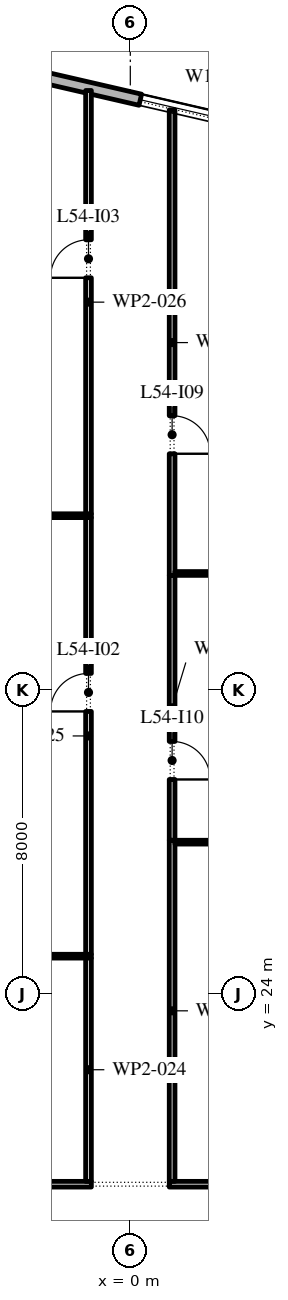
"""IFC4 building model, lengths in metres.
Left out: names, types, materials, properties, quantities, classifications, styles, units other than length and angle.
Written with IfcOpenShell. Run it as: python <this file> out.ifc"""

import sys

from ifc_helpers import new_model, si_unit, direction, frame, frame_2d, origin, place, context, subcontext, project, spatial, rectangle, extrude, element, fill, save


model = new_model("IFC4")
c1 = context("Model", 3, precision=1e-05, world=origin(), true_north=direction((0.0, 1.0)))
c2 = subcontext(c1, "Body", "Model", "MODEL_VIEW")
j1 = project(units=[si_unit("LENGTHUNIT", "METRE"), si_unit("PLANEANGLEUNIT", "RADIAN")], contexts=[c1])
p1 = place(None, origin())
s1 = spatial("IfcSite", under=j1, at=p1, CompositionType="ELEMENT")
p2 = place(p1, origin())
s2 = spatial("IfcBuilding", under=s1, at=p2, CompositionType="ELEMENT")
p3 = place(p2, frame((0.0, 0.0, 251.4)))
s3 = spatial("IfcBuildingStorey", under=s2, at=p3, CompositionType="ELEMENT", Elevation=251.4)
p4 = place(p3, frame((29.616, 40.758, 0.0), z_axis=(0.0, 0.0, 1.0), x_axis=(-0.974370532314, 0.224949029246, 0.0)))
e1 = element("IfcWall", 1, at=p4, inside=s3, PredefinedType="STANDARD", context=c2, shape_type="SweptSolid", body=[
    extrude(rectangle(XDim=48.0, YDim=0.3, at=frame_2d((24.0, 0.0))), origin(), (0.0, 0.0, 1.0), 4.0),
])
p5 = place(p4, frame((1.625, 0.0, 0.45)))
e2 = element("IfcOpeningElement", 2, at=p5, cuts=e1, PredefinedType="OPENING", context=c2, shape_type="SweptSolid", body=[
    extrude(rectangle(XDim=4.5, YDim=2.675, at=frame_2d((2.25, 1.337))), frame((0.0, 0.16, 0.0), z_axis=(0.0, -1.0, 0.0), x_axis=(1.0, 0.0, 0.0)), (0.0, 0.0, 1.0), 0.32),
])
p6 = place(p4, frame((9.975, 0.0, 0.0)))
e3 = element("IfcOpeningElement", 3, at=p6, cuts=e1, PredefinedType="OPENING", context=c2, shape_type="SweptSolid", body=[
    extrude(rectangle(XDim=2.4, YDim=3.5, at=frame_2d((1.2, 1.75))), frame((0.0, 0.16, 0.0), z_axis=(0.0, -1.0, 0.0), x_axis=(1.0, 0.0, 0.0)), (0.0, 0.0, 1.0), 0.32),
])
p7 = place(p4, frame((17.575, 0.0, 0.45)))
e4 = element("IfcOpeningElement", 4, at=p7, cuts=e1, PredefinedType="OPENING", context=c2, shape_type="SweptSolid", body=[
    extrude(rectangle(XDim=4.5, YDim=2.525, at=frame_2d((2.25, 1.262))), frame((0.0, 0.16, 0.0), z_axis=(0.0, -1.0, 0.0), x_axis=(1.0, 0.0, 0.0)), (0.0, 0.0, 1.0), 0.32),
])
p8 = place(p4, frame((25.625, 0.0, 0.45)))
e5 = element("IfcOpeningElement", 5, at=p8, cuts=e1, PredefinedType="OPENING", context=c2, shape_type="SweptSolid", body=[
    extrude(rectangle(XDim=4.5, YDim=2.45, at=frame_2d((2.25, 1.225))), frame((0.0, 0.16, 0.0), z_axis=(0.0, -1.0, 0.0), x_axis=(1.0, 0.0, 0.0)), (0.0, 0.0, 1.0), 0.32),
])
p9 = place(p4, frame((33.675, 0.0, 0.45)))
e6 = element("IfcOpeningElement", 6, at=p9, cuts=e1, PredefinedType="OPENING", context=c2, shape_type="SweptSolid", body=[
    extrude(rectangle(XDim=4.5, YDim=2.45, at=frame_2d((2.25, 1.225))), frame((0.0, 0.16, 0.0), z_axis=(0.0, -1.0, 0.0), x_axis=(1.0, 0.0, 0.0)), (0.0, 0.0, 1.0), 0.32),
])
p10 = place(p4, frame((42.775, 0.0, 0.0)))
e7 = element("IfcOpeningElement", 7, at=p10, cuts=e1, PredefinedType="OPENING", context=c2, shape_type="SweptSolid", body=[
    extrude(rectangle(XDim=2.4, YDim=3.5, at=frame_2d((1.2, 1.75))), frame((0.0, 0.16, 0.0), z_axis=(0.0, -1.0, 0.0), x_axis=(1.0, 0.0, 0.0)), (0.0, 0.0, 1.0), 0.32),
])
p11 = place(p3, frame((-9.29, 36.59, 0.0), z_axis=(0.0, 0.0, 1.0), x_axis=(1.0, 0.0, 0.0)))
e8 = element("IfcWall", 8, at=p11, inside=s3, PredefinedType="PARTITIONING", context=c2, shape_type="SweptSolid", body=[
    extrude(rectangle(XDim=8.265, YDim=0.1, at=frame_2d((4.133, 0.0))), origin(), (0.0, 0.0, 1.0), 4.0),
])
p12 = place(p3, frame((-8.075, 19.0, 0.0), z_axis=(0.0, 0.0, 1.0), x_axis=(1.0, 0.0, 0.0)))
e9 = element("IfcWall", 9, at=p12, inside=s3, PredefinedType="PARTITIONING", context=c2, shape_type="SweptSolid", body=[
    extrude(rectangle(XDim=7.05, YDim=0.15, at=frame_2d((3.525, 0.0))), origin(), (0.0, 0.0, 1.0), 4.0),
])
p13 = place(p12, frame((3.075, 0.0, 0.0)))
e10 = element("IfcOpeningElement", 10, at=p13, cuts=e9, PredefinedType="OPENING", context=c2, shape_type="SweptSolid", body=[
    extrude(rectangle(XDim=1.0, YDim=2.1, at=frame_2d((0.5, 1.05))), frame((0.0, 0.085, 0.0), z_axis=(0.0, -1.0, 0.0), x_axis=(1.0, 0.0, 0.0)), (0.0, 0.0, 1.0), 0.17),
])
p14 = place(p3, frame((-7.925, 25.0, 0.0), z_axis=(0.0, 0.0, 1.0), x_axis=(1.0, 0.0, 0.0)))
e11 = element("IfcWall", 11, at=p14, inside=s3, PredefinedType="PARTITIONING", context=c2, shape_type="SweptSolid", body=[
    extrude(rectangle(XDim=6.9, YDim=0.1, at=frame_2d((3.45, 0.0))), origin(), (0.0, 0.0, 1.0), 4.0),
])
p15 = place(p3, frame((-1.1, 19.075, 0.0), z_axis=(0.0, 0.0, 1.0), x_axis=(0.0, 1.0, 0.0)))
e12 = element("IfcWall", 12, at=p15, inside=s3, PredefinedType="PARTITIONING", context=c2, shape_type="SweptSolid", body=[
    extrude(rectangle(XDim=5.875, YDim=0.15, at=frame_2d((2.938, 0.0))), origin(), (0.0, 0.0, 1.0), 4.0),
])
p16 = place(p3, frame((-1.1, 25.05, 0.0), z_axis=(0.0, 0.0, 1.0), x_axis=(0.0, 1.0, 0.0)))
e13 = element("IfcWall", 13, at=p16, inside=s3, PredefinedType="PARTITIONING", context=c2, shape_type="SweptSolid", body=[
    extrude(rectangle(XDim=11.49, YDim=0.15, at=frame_2d((5.745, 0.0))), origin(), (0.0, 0.0, 1.0), 4.0),
])
p17 = place(p16, frame((6.39, 0.0, 0.0)))
e14 = element("IfcOpeningElement", 14, at=p17, cuts=e13, PredefinedType="OPENING", context=c2, shape_type="SweptSolid", body=[
    extrude(rectangle(XDim=1.0, YDim=2.1, at=frame_2d((0.5, 1.05))), frame((0.0, 0.085, 0.0), z_axis=(0.0, -1.0, 0.0), x_axis=(1.0, 0.0, 0.0)), (0.0, 0.0, 1.0), 0.17),
])
p18 = place(p3, frame((-1.1, 36.64, 0.0), z_axis=(0.0, 0.0, 1.0), x_axis=(0.0, 1.0, 0.0)))
e15 = element("IfcWall", 15, at=p18, inside=s3, PredefinedType="PARTITIONING", context=c2, shape_type="SweptSolid", body=[
    extrude(rectangle(XDim=11.138, YDim=0.15, at=frame_2d((5.569, 0.0))), origin(), (0.0, 0.0, 1.0), 4.0),
])
p19 = place(p18, frame((6.21, 0.0, 0.0)))
e16 = element("IfcOpeningElement", 16, at=p19, cuts=e15, PredefinedType="OPENING", context=c2, shape_type="SweptSolid", body=[
    extrude(rectangle(XDim=1.0, YDim=2.1, at=frame_2d((0.5, 1.05))), frame((0.0, 0.085, 0.0), z_axis=(0.0, -1.0, 0.0), x_axis=(1.0, 0.0, 0.0)), (0.0, 0.0, 1.0), 0.17),
])
p20 = place(p3, frame((1.025, 19.0, 0.0), z_axis=(0.0, 0.0, 1.0), x_axis=(1.0, 0.0, 0.0)))
e17 = element("IfcWall", 17, at=p20, inside=s3, PredefinedType="PARTITIONING", context=c2, shape_type="SweptSolid", body=[
    extrude(rectangle(XDim=7.05, YDim=0.15, at=frame_2d((3.525, 0.0))), origin(), (0.0, 0.0, 1.0), 4.0),
])
p21 = place(p3, frame((1.1, 28.05, 0.0), z_axis=(0.0, 0.0, 1.0), x_axis=(0.0, -1.0, 0.0)))
e18 = element("IfcWall", 18, at=p21, inside=s3, PredefinedType="PARTITIONING", context=c2, shape_type="SweptSolid", body=[
    extrude(rectangle(XDim=8.975, YDim=0.15, at=frame_2d((4.488, 0.0))), origin(), (0.0, 0.0, 1.0), 4.0),
])
p22 = place(p3, frame((1.175, 28.0, 0.0), z_axis=(0.0, 0.0, 1.0), x_axis=(1.0, 0.0, 0.0)))
e19 = element("IfcWall", 19, at=p22, inside=s3, PredefinedType="PARTITIONING", context=c2, shape_type="SweptSolid", body=[
    extrude(rectangle(XDim=6.9, YDim=0.1, at=frame_2d((3.45, 0.0))), origin(), (0.0, 0.0, 1.0), 4.0),
])
p23 = place(p3, frame((1.1, 35.02, 0.0), z_axis=(0.0, 0.0, 1.0), x_axis=(0.0, -1.0, 0.0)))
e20 = element("IfcWall", 20, at=p23, inside=s3, PredefinedType="PARTITIONING", context=c2, shape_type="SweptSolid", body=[
    extrude(rectangle(XDim=6.97, YDim=0.15, at=frame_2d((3.485, 0.0))), origin(), (0.0, 0.0, 1.0), 4.0),
])
p24 = place(p23, frame((4.37, 0.0, 0.0)))
e21 = element("IfcOpeningElement", 21, at=p24, cuts=e20, PredefinedType="OPENING", context=c2, shape_type="SweptSolid", body=[
    extrude(rectangle(XDim=1.0, YDim=2.1, at=frame_2d((0.5, 1.05))), frame((0.0, 0.085, 0.0), z_axis=(0.0, -1.0, 0.0), x_axis=(1.0, 0.0, 0.0)), (0.0, 0.0, 1.0), 0.17),
])
p25 = place(p3, frame((1.1, 47.27, 0.0), z_axis=(0.0, 0.0, 1.0), x_axis=(0.0, -1.0, 0.0)))
e22 = element("IfcWall", 22, at=p25, inside=s3, PredefinedType="PARTITIONING", context=c2, shape_type="SweptSolid", body=[
    extrude(rectangle(XDim=12.25, YDim=0.15, at=frame_2d((6.125, 0.0))), origin(), (0.0, 0.0, 1.0), 4.0),
])
p26 = place(p25, frame((8.05, 0.0, 0.0)))
e23 = element("IfcOpeningElement", 23, at=p26, cuts=e22, PredefinedType="OPENING", context=c2, shape_type="SweptSolid", body=[
    extrude(rectangle(XDim=1.0, YDim=2.1, at=frame_2d((0.5, 1.05))), frame((0.0, 0.085, 0.0), z_axis=(0.0, -1.0, 0.0), x_axis=(1.0, 0.0, 0.0)), (0.0, 0.0, 1.0), 0.17),
])
p27 = place(p3, frame((7.935, 35.07, 0.0), z_axis=(0.0, 0.0, 1.0), x_axis=(-1.0, 0.0, 0.0)))
e24 = element("IfcWall", 24, at=p27, inside=s3, PredefinedType="PARTITIONING", context=c2, shape_type="SweptSolid", body=[
    extrude(rectangle(XDim=6.76, YDim=0.1, at=frame_2d((3.38, 0.0))), origin(), (0.0, 0.0, 1.0), 4.0),
])
p28 = place(p8, origin())
e25 = element("IfcWindow", 25, at=p28, inside=s3, PartitioningType="DOUBLE_PANEL_VERTICAL", PredefinedType="WINDOW", context=c2, shape_type="SweptSolid", body=[
    extrude(rectangle(XDim=4.5, YDim=2.45, at=frame_2d((2.25, 1.225))), frame((0.0, 0.03, 0.0), z_axis=(0.0, -1.0, 0.0), x_axis=(1.0, 0.0, 0.0)), (0.0, 0.0, 1.0), 0.06),
])
fill(e5, e25)
p29 = place(p17, origin())
e26 = element("IfcDoor", 26, at=p29, inside=s3, OperationType="SINGLE_SWING_RIGHT", PredefinedType="DOOR", context=c2, shape_type="SweptSolid", body=[
    extrude(rectangle(XDim=1.0, YDim=2.1, at=frame_2d((0.5, 1.05))), frame((0.0, 0.025, 0.0), z_axis=(0.0, -1.0, 0.0), x_axis=(1.0, 0.0, 0.0)), (0.0, 0.0, 1.0), 0.05),
])
fill(e14, e26)
p30 = place(p19, origin())
e27 = element("IfcDoor", 27, at=p30, inside=s3, OperationType="SINGLE_SWING_RIGHT", PredefinedType="DOOR", context=c2, shape_type="SweptSolid", body=[
    extrude(rectangle(XDim=1.0, YDim=2.1, at=frame_2d((0.5, 1.05))), frame((0.0, 0.025, 0.0), z_axis=(0.0, -1.0, 0.0), x_axis=(1.0, 0.0, 0.0)), (0.0, 0.0, 1.0), 0.05),
])
fill(e16, e27)
p31 = place(p26, origin())
e28 = element("IfcDoor", 28, at=p31, inside=s3, OperationType="SINGLE_SWING_LEFT", PredefinedType="DOOR", context=c2, shape_type="SweptSolid", body=[
    extrude(rectangle(XDim=1.0, YDim=2.1, at=frame_2d((0.5, 1.05))), frame((0.0, 0.025, 0.0), z_axis=(0.0, -1.0, 0.0), x_axis=(1.0, 0.0, 0.0)), (0.0, 0.0, 1.0), 0.05),
])
fill(e23, e28)
p32 = place(p24, origin())
e29 = element("IfcDoor", 29, at=p32, inside=s3, OperationType="SINGLE_SWING_LEFT", PredefinedType="DOOR", context=c2, shape_type="SweptSolid", body=[
    extrude(rectangle(XDim=1.0, YDim=2.1, at=frame_2d((0.5, 1.05))), frame((0.0, 0.025, 0.0), z_axis=(0.0, -1.0, 0.0), x_axis=(1.0, 0.0, 0.0)), (0.0, 0.0, 1.0), 0.05),
])
fill(e21, e29)
save(model, sys.argv[1])
